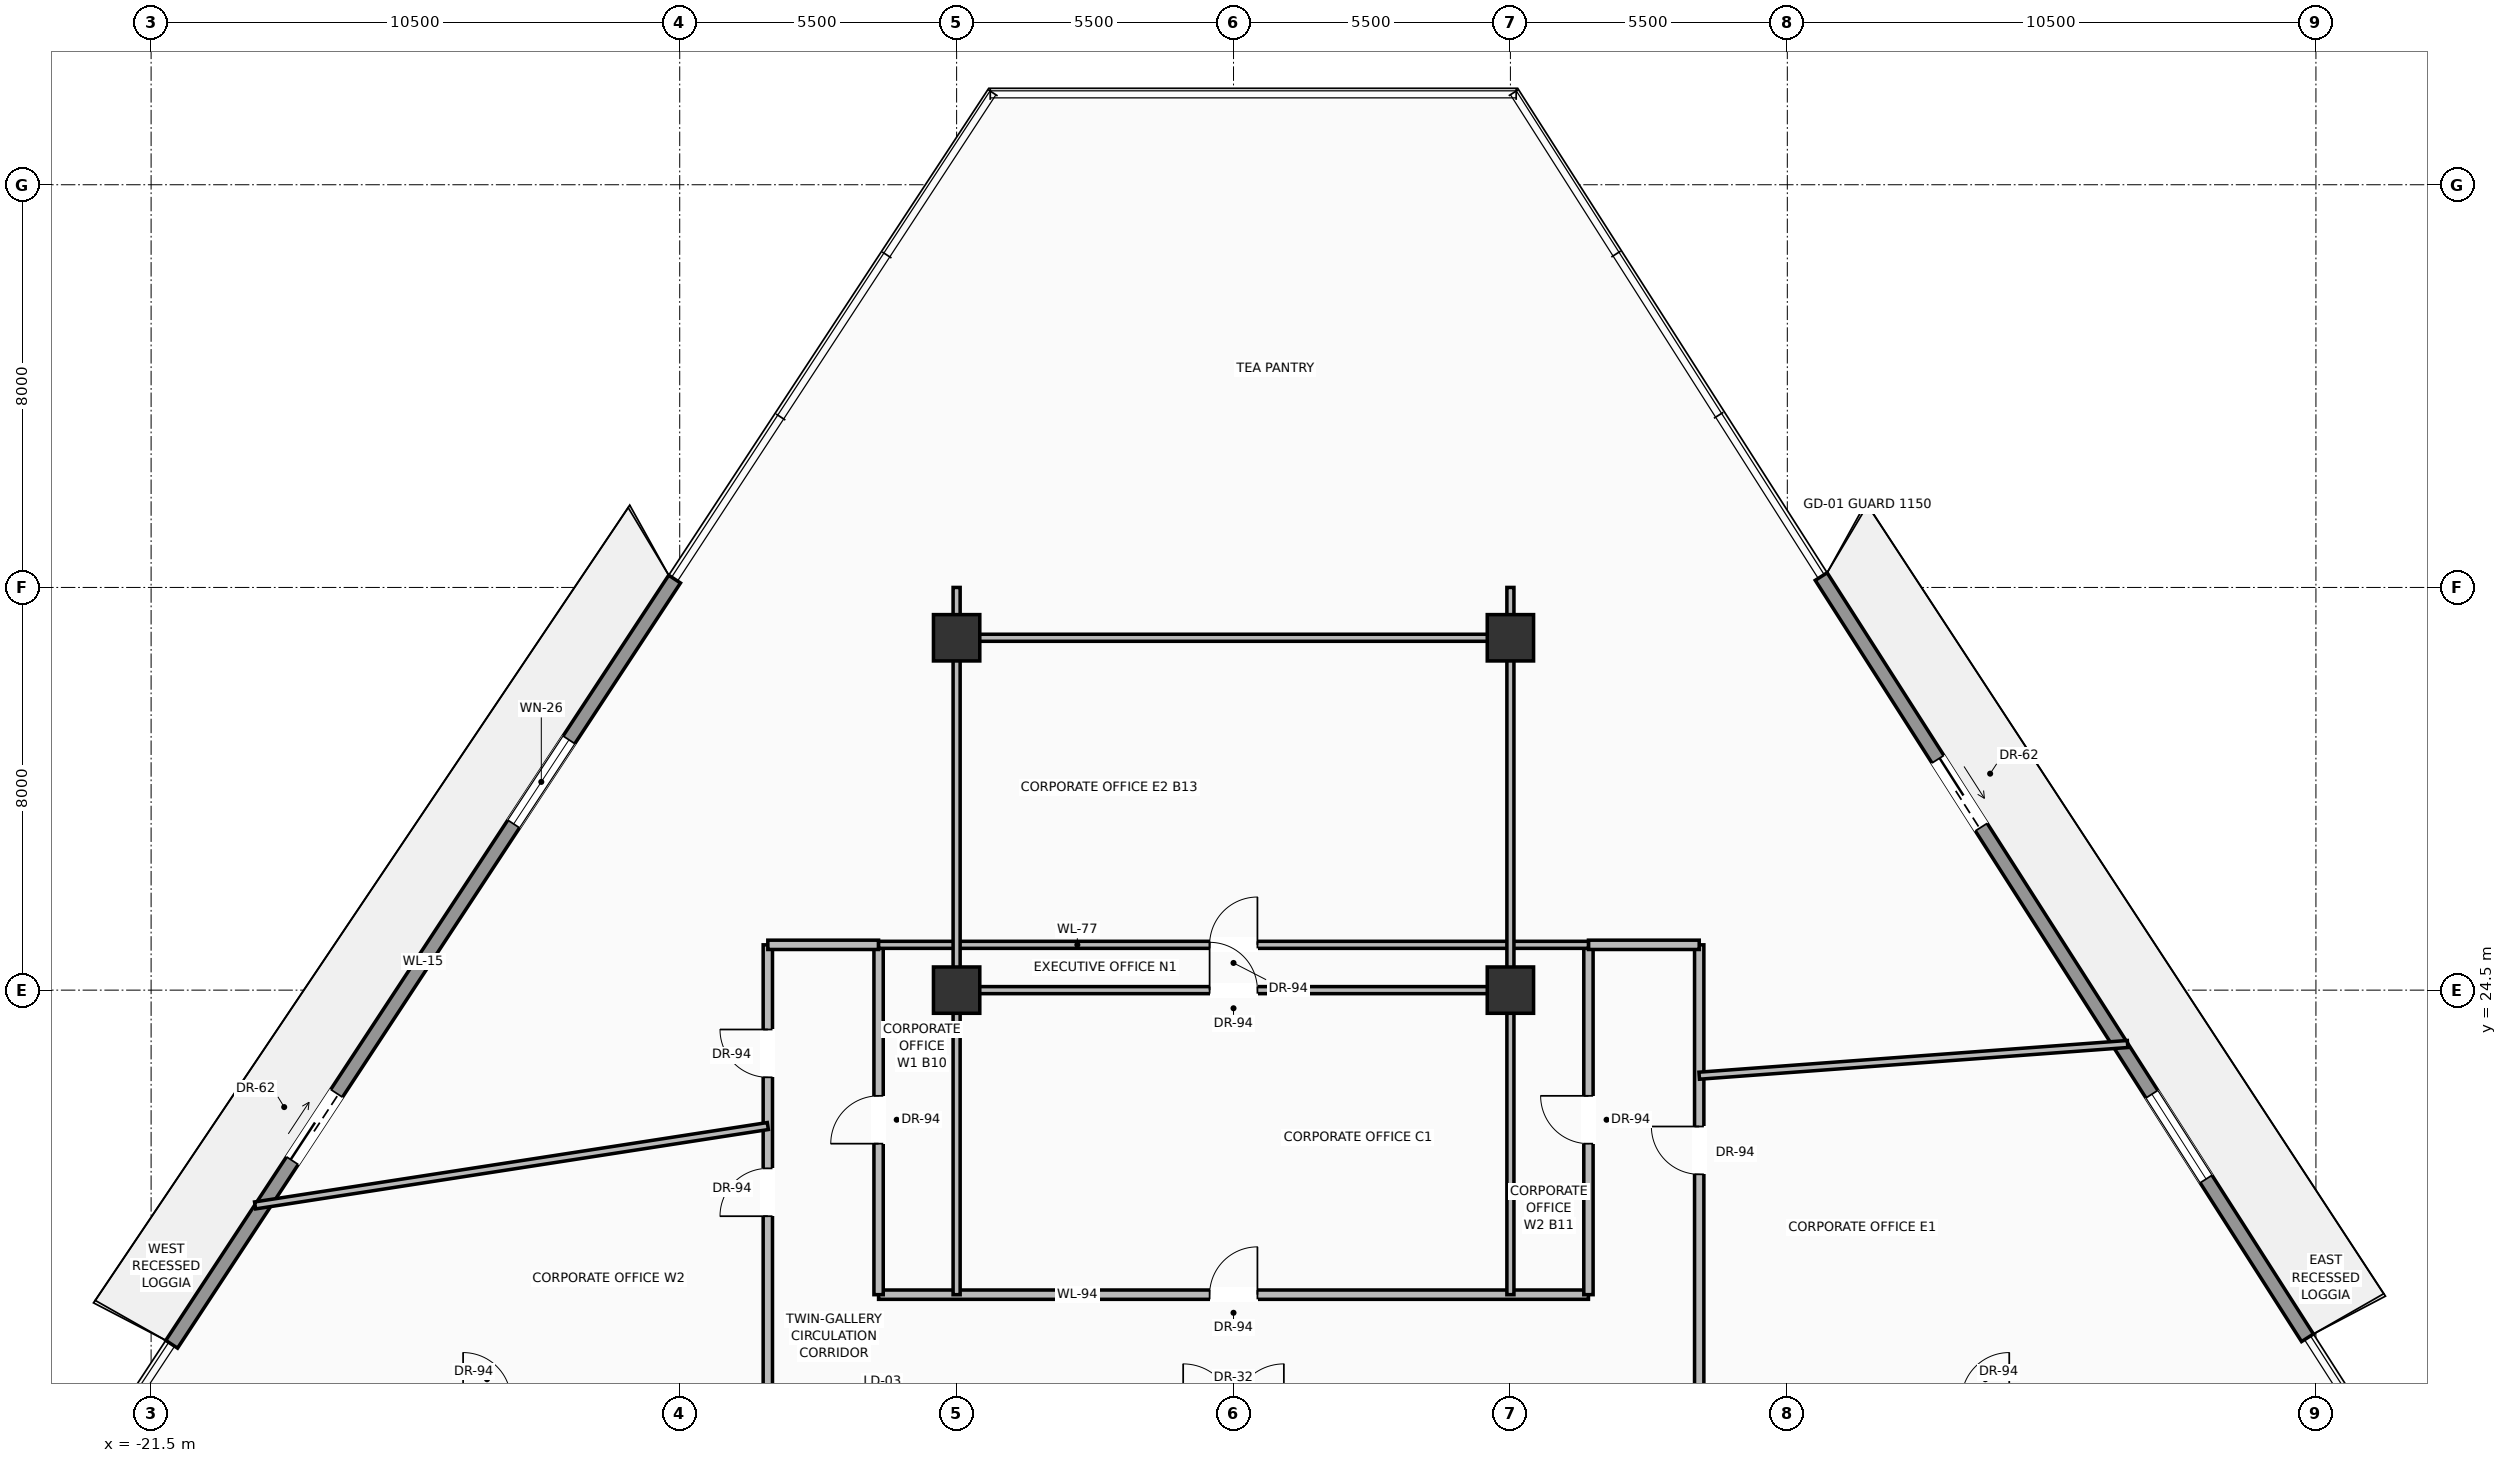
"""IFC4 building model, lengths in metres.
Left out: names, types, materials, properties, quantities, classifications, styles, units other than length and angle.
Written with IfcOpenShell. Run it as: python <this file> out.ifc"""

import sys

from ifc_helpers import new_model, si_unit, direction, frame, frame_2d, origin, origin_2d, place, context, subcontext, project, spatial, rectangle, extrude, source, transform, mapped, element, fill, save


model = new_model("IFC4")
c1 = context("Model", 3, precision=1e-05, world=origin(), true_north=direction((0.0, 1.0)))
c2 = subcontext(c1, "Body", "Model", "MODEL_VIEW")
j1 = project(units=[si_unit("LENGTHUNIT", "METRE"), si_unit("PLANEANGLEUNIT", "RADIAN")], contexts=[c1])
p1 = place(None, origin())
s1 = spatial("IfcSite", under=j1, at=p1, CompositionType="ELEMENT")
p2 = place(p1, origin())
s2 = spatial("IfcBuilding", under=s1, at=p2, CompositionType="ELEMENT")
p3 = place(p2, frame((0.0, 0.0, 129.3)))
s3 = spatial("IfcBuildingStorey", under=s2, at=p3, CompositionType="ELEMENT", Elevation=129.3)
m1 = source(origin(), c2, "Body", "SweptSolid", [
    extrude(rectangle(XDim=0.92, YDim=0.92, at=origin_2d()), origin(), (0.0, 0.0, 1.0), 3.7),
])
for number, where, z_axis, x_axis in (
    (1, (-5.5, 24.5, 0.0), (0.0, 0.0, 1.0), (1.0, 0.0, 0.0)),
    (2, (5.5, 24.5, 0.0), (0.0, 0.0, 1.0), (1.0, 0.0, 0.0)),
    (3, (-5.5, 31.5, 0.0), (0.0, 0.0, 1.0), (1.0, 0.0, 0.0)),
    (4, (5.5, 31.5, 0.0), (0.0, 0.0, 1.0), (1.0, 0.0, 0.0)),
):
    element("IfcColumn", number, at=place(p3, frame(where, z_axis=z_axis, x_axis=x_axis)), inside=s3, PredefinedType="COLUMN", context=c2, shape_type="MappedRepresentation", body=[
        mapped(m1, transform((0.0, 0.0, 0.0), scale=1.0)),
    ])
p4 = place(p3, frame((-21.091, 17.464, 0.0), z_axis=(0.0, 0.0, 1.0), x_axis=(0.549184046642, 0.835701431681, 0.0)))
e5 = element("IfcWall", 5, at=p4, inside=s3, PredefinedType="SOLIDWALL", context=c2, shape_type="SweptSolid", body=[
    extrude(rectangle(XDim=18.19, YDim=0.28, at=frame_2d((9.095, 0.0))), origin(), (0.0, 0.0, 1.0), 3.05),
])
p5 = place(p4, frame((4.365, 0.0, 0.0)))
e6 = element("IfcOpeningElement", 6, at=p5, cuts=e5, PredefinedType="OPENING", context=c2, shape_type="SweptSolid", body=[
    extrude(rectangle(XDim=1.6, YDim=2.35, at=frame_2d((0.8, 1.175))), frame((0.0, 0.15, 0.0), z_axis=(0.0, -1.0, 0.0), x_axis=(1.0, 0.0, 0.0)), (0.0, 0.0, 1.0), 0.3),
])
p6 = place(p4, frame((12.369, 0.0, 0.9)))
e7 = element("IfcOpeningElement", 7, at=p6, cuts=e5, PredefinedType="OPENING", context=c2, shape_type="SweptSolid", body=[
    extrude(rectangle(XDim=2.0, YDim=1.85, at=frame_2d((1.0, 0.925))), frame((0.0, 0.15, 0.0), z_axis=(0.0, -1.0, 0.0), x_axis=(1.0, 0.0, 0.0)), (0.0, 0.0, 1.0), 0.3),
])
p7 = place(p3, frame((11.673, 32.717, 0.0), z_axis=(0.0, 0.0, 1.0), x_axis=(0.538267430492, -0.842774093854, 0.0)))
e8 = element("IfcWall", 8, at=p7, inside=s3, PredefinedType="SOLIDWALL", context=c2, shape_type="SweptSolid", body=[
    extrude(rectangle(XDim=17.945, YDim=0.28, at=frame_2d((8.972, 0.0))), origin(), (0.0, 0.0, 1.0), 3.05),
])
p8 = place(p7, frame((4.307, 0.0, 0.0)))
e9 = element("IfcOpeningElement", 9, at=p8, cuts=e8, PredefinedType="OPENING", context=c2, shape_type="SweptSolid", body=[
    extrude(rectangle(XDim=1.6, YDim=2.35, at=frame_2d((0.8, 1.175))), frame((0.0, 0.15, 0.0), z_axis=(0.0, -1.0, 0.0), x_axis=(1.0, 0.0, 0.0)), (0.0, 0.0, 1.0), 0.3),
])
p9 = place(p7, frame((12.202, 0.0, 0.9)))
e10 = element("IfcOpeningElement", 10, at=p9, cuts=e8, PredefinedType="OPENING", context=c2, shape_type="SweptSolid", body=[
    extrude(rectangle(XDim=2.0, YDim=1.85, at=frame_2d((1.0, 0.925))), frame((0.0, 0.15, 0.0), z_axis=(0.0, -1.0, 0.0), x_axis=(1.0, 0.0, 0.0)), (0.0, 0.0, 1.0), 0.3),
])
p10 = place(p3, frame((-7.05, 18.45, 0.0), z_axis=(0.0, 0.0, 1.0), x_axis=(1.0, 0.0, 0.0)))
e11 = element("IfcWall", 11, at=p10, inside=s3, PredefinedType="PARTITIONING", context=c2, shape_type="SweptSolid", body=[
    extrude(rectangle(XDim=14.1, YDim=0.185, at=frame_2d((7.05, 0.0))), origin(), (0.0, 0.0, 1.0), 2.846),
])
p11 = place(p10, frame((6.575, 0.0, 0.0)))
e12 = element("IfcOpeningElement", 12, at=p11, cuts=e11, PredefinedType="OPENING", context=c2, shape_type="SweptSolid", body=[
    extrude(rectangle(XDim=0.95, YDim=2.2, at=frame_2d((0.475, 1.1))), frame((0.0, 0.103, 0.0), z_axis=(0.0, -1.0, 0.0), x_axis=(1.0, 0.0, 0.0)), (0.0, 0.0, 1.0), 0.205),
])
p12 = place(p3, frame((-7.05, 18.45, 0.0), z_axis=(0.0, 0.0, 1.0), x_axis=(0.0, 1.0, 0.0)))
e13 = element("IfcWall", 13, at=p12, inside=s3, PredefinedType="PARTITIONING", context=c2, shape_type="SweptSolid", body=[
    extrude(rectangle(XDim=6.95, YDim=0.185, at=frame_2d((3.475, 0.0))), origin(), (0.0, 0.0, 1.0), 2.846),
])
p13 = place(p12, frame((3.0, 0.0, 0.0)))
e14 = element("IfcOpeningElement", 14, at=p13, cuts=e13, PredefinedType="OPENING", context=c2, shape_type="SweptSolid", body=[
    extrude(rectangle(XDim=0.95, YDim=2.2, at=frame_2d((0.475, 1.1))), frame((0.0, 0.103, 0.0), z_axis=(0.0, -1.0, 0.0), x_axis=(1.0, 0.0, 0.0)), (0.0, 0.0, 1.0), 0.205),
])
p14 = place(p3, frame((7.05, 18.45, 0.0), z_axis=(0.0, 0.0, 1.0), x_axis=(0.0, 1.0, 0.0)))
e15 = element("IfcWall", 15, at=p14, inside=s3, PredefinedType="PARTITIONING", context=c2, shape_type="SweptSolid", body=[
    extrude(rectangle(XDim=6.95, YDim=0.185, at=frame_2d((3.475, 0.0))), origin(), (0.0, 0.0, 1.0), 2.846),
])
p15 = place(p14, frame((3.0, 0.0, 0.0)))
e16 = element("IfcOpeningElement", 16, at=p15, cuts=e15, PredefinedType="OPENING", context=c2, shape_type="SweptSolid", body=[
    extrude(rectangle(XDim=0.95, YDim=2.2, at=frame_2d((0.475, 1.1))), frame((0.0, 0.103, 0.0), z_axis=(0.0, -1.0, 0.0), x_axis=(1.0, 0.0, 0.0)), (0.0, 0.0, 1.0), 0.205),
])
p16 = place(p3, frame((-9.25, 16.4, 0.0), z_axis=(0.0, 0.0, 1.0), x_axis=(0.0, 1.0, 0.0)))
e17 = element("IfcWall", 17, at=p16, inside=s3, PredefinedType="PARTITIONING", context=c2, shape_type="SweptSolid", body=[
    extrude(rectangle(XDim=9.0, YDim=0.185, at=frame_2d((4.5, 0.0))), origin(), (0.0, 0.0, 1.0), 2.846),
])
p17 = place(p16, frame((3.609, 0.0, 0.0)))
e18 = element("IfcOpeningElement", 18, at=p17, cuts=e17, PredefinedType="OPENING", context=c2, shape_type="SweptSolid", body=[
    extrude(rectangle(XDim=0.95, YDim=2.2, at=frame_2d((0.475, 1.1))), frame((0.0, 0.103, 0.0), z_axis=(0.0, -1.0, 0.0), x_axis=(1.0, 0.0, 0.0)), (0.0, 0.0, 1.0), 0.205),
])
p18 = place(p16, frame((6.368, 0.0, 0.0)))
e19 = element("IfcOpeningElement", 19, at=p18, cuts=e17, PredefinedType="OPENING", context=c2, shape_type="SweptSolid", body=[
    extrude(rectangle(XDim=0.95, YDim=2.2, at=frame_2d((0.475, 1.1))), frame((0.0, 0.103, 0.0), z_axis=(0.0, -1.0, 0.0), x_axis=(1.0, 0.0, 0.0)), (0.0, 0.0, 1.0), 0.205),
])
p19 = place(p3, frame((9.25, 16.4, 0.0), z_axis=(0.0, 0.0, 1.0), x_axis=(0.0, 1.0, 0.0)))
e20 = element("IfcWall", 20, at=p19, inside=s3, PredefinedType="PARTITIONING", context=c2, shape_type="SweptSolid", body=[
    extrude(rectangle(XDim=9.0, YDim=0.185, at=frame_2d((4.5, 0.0))), origin(), (0.0, 0.0, 1.0), 2.846),
])
p20 = place(p19, frame((4.441, 0.0, 0.0)))
e21 = element("IfcOpeningElement", 21, at=p20, cuts=e20, PredefinedType="OPENING", context=c2, shape_type="SweptSolid", body=[
    extrude(rectangle(XDim=0.95, YDim=2.2, at=frame_2d((0.475, 1.1))), frame((0.0, 0.103, 0.0), z_axis=(0.0, -1.0, 0.0), x_axis=(1.0, 0.0, 0.0)), (0.0, 0.0, 1.0), 0.205),
])
for number, where, z_axis, x_axis in (
    (22, (-9.25, 25.4, 0.0), (0.0, 0.0, 1.0), (1.0, 0.0, 0.0)),
    (23, (7.05, 25.4, 0.0), (0.0, 0.0, 1.0), (1.0, 0.0, 0.0)),
):
    element("IfcWall", number, at=place(p3, frame(where, z_axis=z_axis, x_axis=x_axis)), inside=s3, PredefinedType="PARTITIONING", context=c2, shape_type="SweptSolid", body=[
        extrude(rectangle(XDim=2.2, YDim=0.185, at=frame_2d((1.1, 0.0))), origin(), (0.0, 0.0, 1.0), 3.462),
    ])
p21 = place(p3, frame((-7.05, 25.4, 0.0), z_axis=(0.0, 0.0, 1.0), x_axis=(1.0, 0.0, 0.0)))
e24 = element("IfcWall", 24, at=p21, inside=s3, PredefinedType="PARTITIONING", context=c2, shape_type="SweptSolid", body=[
    extrude(rectangle(XDim=14.1, YDim=0.14, at=frame_2d((7.05, 0.0))), origin(), (0.0, 0.0, 1.0), 3.462),
])
p22 = place(p21, frame((6.575, 0.0, 0.0)))
e25 = element("IfcOpeningElement", 25, at=p22, cuts=e24, PredefinedType="OPENING", context=c2, shape_type="SweptSolid", body=[
    extrude(rectangle(XDim=0.95, YDim=2.2, at=frame_2d((0.475, 1.1))), frame((0.0, 0.08, 0.0), z_axis=(0.0, -1.0, 0.0), x_axis=(1.0, 0.0, 0.0)), (0.0, 0.0, 1.0), 0.16),
])
for number, where, z_axis, x_axis in (
    (26, (-5.5, 18.45, 0.0), (0.0, 0.0, 1.0), (0.0, 1.0, 0.0)),
    (27, (5.5, 18.45, 0.0), (0.0, 0.0, 1.0), (0.0, 1.0, 0.0)),
):
    element("IfcWall", number, at=place(p3, frame(where, z_axis=z_axis, x_axis=x_axis)), inside=s3, PredefinedType="PARTITIONING", context=c2, shape_type="SweptSolid", body=[
        extrude(rectangle(XDim=14.05, YDim=0.14, at=frame_2d((7.025, 0.0))), origin(), (0.0, 0.0, 1.0), 2.846),
    ])
p23 = place(p3, frame((-5.5, 24.5, 0.0), z_axis=(0.0, 0.0, 1.0), x_axis=(1.0, 0.0, 0.0)))
e28 = element("IfcWall", 28, at=p23, inside=s3, PredefinedType="PARTITIONING", context=c2, shape_type="SweptSolid", body=[
    extrude(rectangle(XDim=11.0, YDim=0.14, at=frame_2d((5.5, 0.0))), origin(), (0.0, 0.0, 1.0), 2.846),
])
p24 = place(p23, frame((5.025, 0.0, 0.0)))
e29 = element("IfcOpeningElement", 29, at=p24, cuts=e28, PredefinedType="OPENING", context=c2, shape_type="SweptSolid", body=[
    extrude(rectangle(XDim=0.95, YDim=2.2, at=frame_2d((0.475, 1.1))), frame((0.0, 0.08, 0.0), z_axis=(0.0, -1.0, 0.0), x_axis=(1.0, 0.0, 0.0)), (0.0, 0.0, 1.0), 0.16),
])
p25 = place(p3, frame((-5.5, 31.5, 0.0), z_axis=(0.0, 0.0, 1.0), x_axis=(1.0, 0.0, 0.0)))
e30 = element("IfcWall", 30, at=p25, inside=s3, PredefinedType="PARTITIONING", context=c2, shape_type="SweptSolid", body=[
    extrude(rectangle(XDim=11.0, YDim=0.14, at=frame_2d((5.5, 0.0))), origin(), (0.0, 0.0, 1.0), 2.846),
])
p26 = place(p3, frame((-19.434, 20.223, 0.0), z_axis=(0.0, 0.0, 1.0), x_axis=(0.988220028994, 0.153039780105, 0.0)))
e31 = element("IfcWall", 31, at=p26, inside=s3, PredefinedType="PARTITIONING", context=c2, shape_type="SweptSolid", body=[
    extrude(rectangle(XDim=10.305, YDim=0.14, at=frame_2d((5.153, 0.0))), origin(), (0.0, 0.0, 1.0), 3.462),
])
p27 = place(p3, frame((9.25, 22.8, 0.0), z_axis=(0.0, 0.0, 1.0), x_axis=(0.997273450808, 0.073794744488, 0.0)))
e32 = element("IfcWall", 32, at=p27, inside=s3, PredefinedType="PARTITIONING", context=c2, shape_type="SweptSolid", body=[
    extrude(rectangle(XDim=8.532, YDim=0.14, at=frame_2d((4.266, 0.0))), origin(), (0.0, 0.0, 1.0), 3.462),
])
m2 = source(origin(), c2, "Body", "SweptSolid", [
    extrude(rectangle(XDim=1.6, YDim=2.35, at=frame_2d((0.8, 1.175))), frame((0.0, 0.025, 0.0), z_axis=(0.0, -1.0, 0.0), x_axis=(1.0, 0.0, 0.0)), (0.0, 0.0, 1.0), 0.05),
])
p28 = place(p5, origin())
e33 = element("IfcDoor", 33, at=p28, inside=s3, OperationType="SLIDING_TO_LEFT", PredefinedType="DOOR", context=c2, shape_type="MappedRepresentation", body=[
    mapped(m2, transform((0.0, 0.0, 0.0), scale=1.0)),
])
fill(e6, e33)
m3 = source(origin(), c2, "Body", "SweptSolid", [
    extrude(rectangle(XDim=2.0, YDim=1.85, at=frame_2d((1.0, 0.925))), frame((0.0, 0.03, 0.0), z_axis=(0.0, -1.0, 0.0), x_axis=(1.0, 0.0, 0.0)), (0.0, 0.0, 1.0), 0.06),
])
p29 = place(p6, origin())
e34 = element("IfcWindow", 34, at=p29, inside=s3, PartitioningType="SINGLE_PANEL", PredefinedType="WINDOW", context=c2, shape_type="MappedRepresentation", body=[
    mapped(m3, transform((0.0, 0.0, 0.0), scale=1.0)),
])
fill(e7, e34)
p30 = place(p8, origin())
e35 = element("IfcDoor", 35, at=p30, inside=s3, OperationType="SLIDING_TO_RIGHT", PredefinedType="DOOR", context=c2, shape_type="MappedRepresentation", body=[
    mapped(m2, transform((0.0, 0.0, 0.0), scale=1.0)),
])
fill(e9, e35)
p31 = place(p9, origin())
e36 = element("IfcWindow", 36, at=p31, inside=s3, PartitioningType="SINGLE_PANEL", PredefinedType="WINDOW", context=c2, shape_type="MappedRepresentation", body=[
    mapped(m3, transform((0.0, 0.0, 0.0), scale=1.0)),
])
fill(e10, e36)
m4 = source(origin(), c2, "Body", "SweptSolid", [
    extrude(rectangle(XDim=0.95, YDim=2.2, at=frame_2d((0.475, 1.1))), frame((0.0, 0.025, 0.0), z_axis=(0.0, -1.0, 0.0), x_axis=(1.0, 0.0, 0.0)), (0.0, 0.0, 1.0), 0.05),
])
p32 = place(p11, origin())
e37 = element("IfcDoor", 37, at=p32, inside=s3, OperationType="SINGLE_SWING_RIGHT", PredefinedType="DOOR", context=c2, shape_type="MappedRepresentation", body=[
    mapped(m4, transform((0.0, 0.0, 0.0), scale=1.0)),
])
fill(e12, e37)
p33 = place(p17, origin())
e38 = element("IfcDoor", 38, at=p33, inside=s3, OperationType="SINGLE_SWING_LEFT", PredefinedType="DOOR", context=c2, shape_type="MappedRepresentation", body=[
    mapped(m4, transform((0.0, 0.0, 0.0), scale=1.0)),
])
fill(e18, e38)
p34 = place(p20, origin())
e39 = element("IfcDoor", 39, at=p34, inside=s3, OperationType="SINGLE_SWING_RIGHT", PredefinedType="DOOR", context=c2, shape_type="MappedRepresentation", body=[
    mapped(m4, transform((0.0, 0.0, 0.0), scale=1.0)),
])
fill(e21, e39)
p35 = place(p13, origin())
e40 = element("IfcDoor", 40, at=p35, inside=s3, OperationType="SINGLE_SWING_LEFT", PredefinedType="DOOR", context=c2, shape_type="MappedRepresentation", body=[
    mapped(m4, transform((0.0, 0.0, 0.0), scale=1.0)),
])
fill(e14, e40)
p36 = place(p15, origin())
e41 = element("IfcDoor", 41, at=p36, inside=s3, OperationType="SINGLE_SWING_RIGHT", PredefinedType="DOOR", context=c2, shape_type="MappedRepresentation", body=[
    mapped(m4, transform((0.0, 0.0, 0.0), scale=1.0)),
])
fill(e16, e41)
p37 = place(p24, origin())
e42 = element("IfcDoor", 42, at=p37, inside=s3, OperationType="SINGLE_SWING_LEFT", PredefinedType="DOOR", context=c2, shape_type="MappedRepresentation", body=[
    mapped(m4, transform((0.0, 0.0, 0.0), scale=1.0)),
])
fill(e29, e42)
p38 = place(p18, origin())
e43 = element("IfcDoor", 43, at=p38, inside=s3, OperationType="SINGLE_SWING_RIGHT", PredefinedType="DOOR", context=c2, shape_type="MappedRepresentation", body=[
    mapped(m4, transform((0.0, 0.0, 0.0), scale=1.0)),
])
fill(e19, e43)
p39 = place(p22, origin())
e44 = element("IfcDoor", 44, at=p39, inside=s3, OperationType="SINGLE_SWING_RIGHT", PredefinedType="DOOR", context=c2, shape_type="MappedRepresentation", body=[
    mapped(m4, transform((0.0, 0.0, 0.0), scale=1.0)),
])
fill(e25, e44)
save(model, sys.argv[1])
